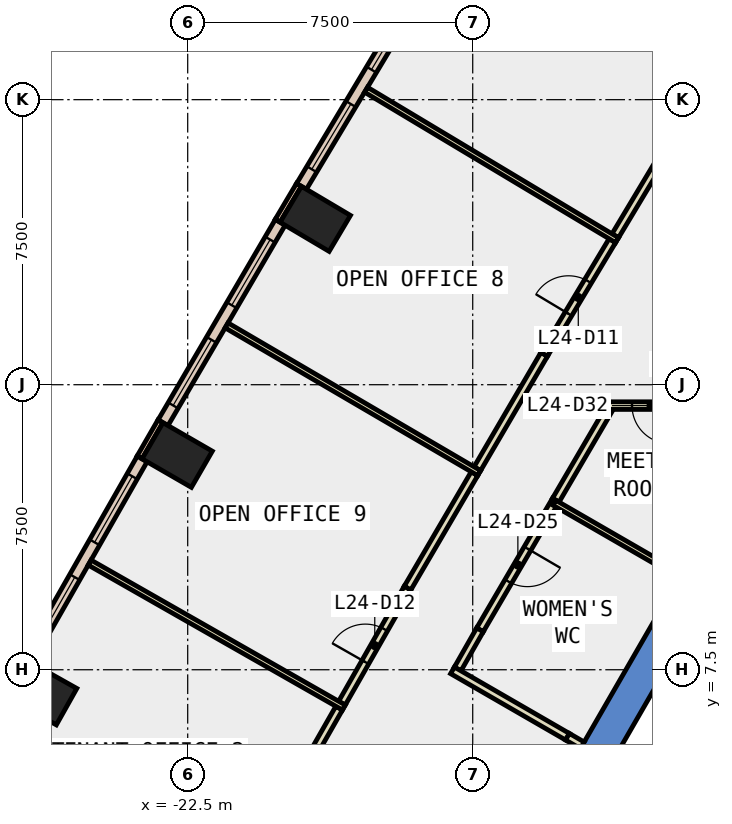
"""IFC4 building model, lengths in metres.
Left out: names, types, materials, properties, quantities, classifications, styles, units other than length and angle.
Written with IfcOpenShell. Run it as: python <this file> out.ifc"""

import sys

from ifc_helpers import new_model, si_unit, direction, frame, frame_2d, origin, origin_2d, place, context, subcontext, project, spatial, polyline, rectangle, outline, extrude, element, fill, save


model = new_model("IFC4")
c1 = context("Model", 3, precision=1e-05, world=origin(), true_north=direction((0.0, 1.0)))
c2 = subcontext(c1, "Body", "Model", "MODEL_VIEW")
j1 = project(units=[si_unit("LENGTHUNIT", "METRE"), si_unit("PLANEANGLEUNIT", "RADIAN")], contexts=[c1])
p1 = place(None, origin())
s1 = spatial("IfcSite", under=j1, at=p1, CompositionType="ELEMENT")
p2 = place(p1, origin())
s2 = spatial("IfcBuilding", under=s1, at=p2, CompositionType="ELEMENT")
p3 = place(p2, frame((0.0, 0.0, 111.8)))
s3 = spatial("IfcBuildingStorey", under=s2, at=p3, CompositionType="ELEMENT", Elevation=111.8)
for number, where, z_axis, x_axis in (
    (1, (-19.143, 19.364, -0.4), (0.0, 0.0, 1.0), (0.51, 0.86, 0.0)),
    (2, (-22.777, 13.15, -0.4), (0.0, 0.0, 1.0), (0.5, 0.866, 0.0)),
    (3, (-26.341, 6.896, -0.4), (0.0, 0.0, 1.0), (0.49, 0.872, 0.0)),
):
    element("IfcColumn", number, at=place(p3, frame(where, z_axis=z_axis, x_axis=x_axis)), inside=s3, PredefinedType="COLUMN", context=c2, shape_type="SweptSolid", body=[
        extrude(rectangle(XDim=1.1, YDim=1.5, at=origin_2d()), origin(), (0.0, 0.0, 1.0), 4.2),
    ])
p4 = place(p3, frame((0.0, 0.0, -0.4)))
e4 = element("IfcWall", 4, at=p4, inside=s3, PredefinedType="SHEAR", context=c2, shape_type="SweptSolid", body=[
    extrude(outline(polyline([(-12.267, 5.252), (-11.488, 4.802), (-6.409, 13.6), (-6.928, 14.5), (-12.267, 5.252)])), origin(), (0.0, 0.0, 1.0), 4.2),
])
p5 = place(p3, frame((-19.572, 20.258, 0.0), z_axis=(0.0, 0.0, 1.0), x_axis=(-0.510082245696, -0.860125631885, 0.0)))
e5 = element("IfcWall", 5, at=p5, inside=s3, PredefinedType="STANDARD", context=c2, shape_type="SweptSolid", body=[
    extrude(rectangle(XDim=1.1, YDim=0.15, at=frame_2d((0.55, 0.0))), origin(), (0.0, 0.0, 1.0), 3.8),
])
p6 = place(p3, frame((-23.216, 14.039, 0.0), z_axis=(0.0, 0.0, 1.0), x_axis=(-0.499837685251, -0.86611909597, 0.0)))
e6 = element("IfcWall", 6, at=p6, inside=s3, PredefinedType="STANDARD", context=c2, shape_type="SweptSolid", body=[
    extrude(rectangle(XDim=1.1, YDim=0.15, at=frame_2d((0.55, 0.0))), origin(), (0.0, 0.0, 1.0), 3.8),
])
p7 = place(p3, frame((-16.365, 25.458, 0.0), z_axis=(0.0, 0.0, 1.0), x_axis=(-0.514078503149, -0.857743139057, 0.0)))
e7 = element("IfcWall", 7, at=p7, inside=s3, PredefinedType="STANDARD", context=c2, shape_type="SweptSolid", body=[
    extrude(rectangle(XDim=6.11, YDim=0.3, at=frame_2d((3.055, 0.0))), origin(), (0.0, 0.0, 1.0), 3.8),
])
p8 = place(p7, frame((0.528, 0.0, 0.9)))
e8 = element("IfcOpeningElement", 8, at=p8, cuts=e7, PredefinedType="OPENING", context=c2, shape_type="SweptSolid", body=[
    extrude(rectangle(XDim=2.0, YDim=2.6, at=frame_2d((1.0, 1.3))), frame((0.0, 0.16, 0.0), z_axis=(0.0, -1.0, 0.0), x_axis=(1.0, 0.0, 0.0)), (0.0, 0.0, 1.0), 0.32),
])
p9 = place(p7, frame((3.583, 0.0, 0.9)))
e9 = element("IfcOpeningElement", 9, at=p9, cuts=e7, PredefinedType="OPENING", context=c2, shape_type="SweptSolid", body=[
    extrude(rectangle(XDim=2.0, YDim=2.6, at=frame_2d((1.0, 1.3))), frame((0.0, 0.16, 0.0), z_axis=(0.0, -1.0, 0.0), x_axis=(1.0, 0.0, 0.0)), (0.0, 0.0, 1.0), 0.32),
])
p10 = place(p3, frame((-20.065, 19.273, 0.0), z_axis=(0.0, 0.0, 1.0), x_axis=(-0.504790055126, -0.863242144619, 0.0)))
e10 = element("IfcWall", 10, at=p10, inside=s3, PredefinedType="STANDARD", context=c2, shape_type="SweptSolid", body=[
    extrude(rectangle(XDim=6.109, YDim=0.3, at=frame_2d((3.055, 0.0))), origin(), (0.0, 0.0, 1.0), 3.8),
])
p11 = place(p10, frame((0.527, 0.0, 0.9)))
e11 = element("IfcOpeningElement", 11, at=p11, cuts=e10, PredefinedType="OPENING", context=c2, shape_type="SweptSolid", body=[
    extrude(rectangle(XDim=2.0, YDim=2.6, at=frame_2d((1.0, 1.3))), frame((0.0, 0.16, 0.0), z_axis=(0.0, -1.0, 0.0), x_axis=(1.0, 0.0, 0.0)), (0.0, 0.0, 1.0), 0.32),
])
p12 = place(p10, frame((3.582, 0.0, 0.9)))
e12 = element("IfcOpeningElement", 12, at=p12, cuts=e10, PredefinedType="OPENING", context=c2, shape_type="SweptSolid", body=[
    extrude(rectangle(XDim=2.0, YDim=2.6, at=frame_2d((1.0, 1.3))), frame((0.0, 0.16, 0.0), z_axis=(0.0, -1.0, 0.0), x_axis=(1.0, 0.0, 0.0)), (0.0, 0.0, 1.0), 0.32),
])
p13 = place(p3, frame((-23.698, 13.048, 0.0), z_axis=(0.0, 0.0, 1.0), x_axis=(-0.495114366991, -0.868827810098, 0.0)))
e13 = element("IfcWall", 13, at=p13, inside=s3, PredefinedType="STANDARD", context=c2, shape_type="SweptSolid", body=[
    extrude(rectangle(XDim=6.11, YDim=0.3, at=frame_2d((3.055, 0.0))), origin(), (0.0, 0.0, 1.0), 3.8),
])
p14 = place(p13, frame((0.527, 0.0, 0.9)))
e14 = element("IfcOpeningElement", 14, at=p14, cuts=e13, PredefinedType="OPENING", context=c2, shape_type="SweptSolid", body=[
    extrude(rectangle(XDim=2.0, YDim=2.6, at=frame_2d((1.0, 1.3))), frame((0.0, 0.16, 0.0), z_axis=(0.0, -1.0, 0.0), x_axis=(1.0, 0.0, 0.0)), (0.0, 0.0, 1.0), 0.32),
])
p15 = place(p13, frame((3.582, 0.0, 0.9)))
e15 = element("IfcOpeningElement", 15, at=p15, cuts=e13, PredefinedType="OPENING", context=c2, shape_type="SweptSolid", body=[
    extrude(rectangle(XDim=2.0, YDim=2.6, at=frame_2d((1.0, 1.3))), frame((0.0, 0.16, 0.0), z_axis=(0.0, -1.0, 0.0), x_axis=(1.0, 0.0, 0.0)), (0.0, 0.0, 1.0), 0.32),
])
p16 = place(p3, frame((-11.409, 14.364, 0.0), z_axis=(0.0, 0.0, 1.0), x_axis=(-0.504846343003, -0.863209227219, 0.0)))
e16 = element("IfcWall", 16, at=p16, inside=s3, PredefinedType="PARTITIONING", context=c2, shape_type="SweptSolid", body=[
    extrude(rectangle(XDim=2.785, YDim=0.2, at=frame_2d((1.393, 0.0))), origin(), (0.0, 0.0, 1.0), 3.8),
])
p17 = place(p3, frame((-12.815, 11.96, 0.0), z_axis=(0.0, 0.0, 1.0), x_axis=(-0.5048198861, -0.863224699946, 0.0)))
e17 = element("IfcWall", 17, at=p17, inside=s3, PredefinedType="PARTITIONING", context=c2, shape_type="SweptSolid", body=[
    extrude(rectangle(XDim=3.95, YDim=0.2, at=frame_2d((1.975, 0.0))), origin(), (0.0, 0.0, 1.0), 3.8),
])
p18 = place(p17, frame((1.475, 0.0, 0.0)))
e18 = element("IfcOpeningElement", 18, at=p18, cuts=e17, PredefinedType="OPENING", context=c2, shape_type="SweptSolid", body=[
    extrude(rectangle(XDim=1.0, YDim=2.1, at=frame_2d((0.5, 1.05))), frame((0.0, 0.11, 0.0), z_axis=(0.0, -1.0, 0.0), x_axis=(1.0, 0.0, 0.0)), (0.0, 0.0, 1.0), 0.22),
])
p19 = place(p3, frame((-14.809, 8.55, 0.0), z_axis=(0.0, 0.0, 1.0), x_axis=(-0.495074026382, -0.868850797549, 0.0)))
e19 = element("IfcWall", 19, at=p19, inside=s3, PredefinedType="PARTITIONING", context=c2, shape_type="SweptSolid", body=[
    extrude(rectangle(XDim=1.186, YDim=0.2, at=frame_2d((0.593, 0.0))), origin(), (0.0, 0.0, 1.0), 3.8),
])
p20 = place(p3, frame((-15.532, 7.484, 0.0), z_axis=(0.0, 0.0, 1.0), x_axis=(0.866045954906, -0.499964402723, 0.0)))
e20 = element("IfcWall", 20, at=p20, inside=s3, PredefinedType="PARTITIONING", context=c2, shape_type="SweptSolid", body=[
    extrude(rectangle(XDim=3.494, YDim=0.2, at=frame_2d((1.747, 0.0))), origin(), (0.0, 0.0, 1.0), 3.8),
])
for number, where, z_axis, x_axis in (
    (21, (-11.249, 18.918, 0.0), (0.0, 0.0, 1.0), (0.514, 0.858, 0.0)),
    (22, (-14.879, 12.789, 0.0), (0.0, 0.0, 1.0), (0.505, 0.863, 0.0)),
):
    element("IfcWall", number, at=place(p3, frame(where, z_axis=z_axis, x_axis=x_axis)), inside=s3, PredefinedType="PARTITIONING", context=c2, shape_type="SweptSolid", body=[
        extrude(rectangle(XDim=3.487, YDim=0.2, at=frame_2d((1.743, 0.0))), origin(), (0.0, 0.0, 1.0), 3.8),
    ])
p21 = place(p3, frame((-13.119, 15.799, 0.0), z_axis=(0.0, 0.0, 1.0), x_axis=(0.514155958966, 0.857696712049, 0.0)))
e23 = element("IfcWall", 23, at=p21, inside=s3, PredefinedType="PARTITIONING", context=c2, shape_type="SweptSolid", body=[
    extrude(rectangle(XDim=3.487, YDim=0.2, at=frame_2d((1.744, 0.0))), origin(), (0.0, 0.0, 1.0), 3.8),
])
p22 = place(p21, frame((1.244, 0.0, 0.0)))
e24 = element("IfcOpeningElement", 24, at=p22, cuts=e23, PredefinedType="OPENING", context=c2, shape_type="SweptSolid", body=[
    extrude(rectangle(XDim=1.0, YDim=2.1, at=frame_2d((0.5, 1.05))), frame((0.0, 0.11, 0.0), z_axis=(0.0, -1.0, 0.0), x_axis=(1.0, 0.0, 0.0)), (0.0, 0.0, 1.0), 0.22),
])
p23 = place(p3, frame((-18.441, 6.621, 0.0), z_axis=(0.0, 0.0, 1.0), x_axis=(0.495286549488, 0.868729666753, 0.0)))
e25 = element("IfcWall", 25, at=p23, inside=s3, PredefinedType="PARTITIONING", context=c2, shape_type="SweptSolid", body=[
    extrude(rectangle(XDim=3.487, YDim=0.2, at=frame_2d((1.743, 0.0))), origin(), (0.0, 0.0, 1.0), 3.8),
])
p24 = place(p23, frame((1.243, 0.0, 0.0)))
e26 = element("IfcOpeningElement", 26, at=p24, cuts=e25, PredefinedType="OPENING", context=c2, shape_type="SweptSolid", body=[
    extrude(rectangle(XDim=1.0, YDim=2.1, at=frame_2d((0.5, 1.05))), frame((0.0, 0.11, 0.0), z_axis=(0.0, -1.0, 0.0), x_axis=(1.0, 0.0, 0.0)), (0.0, 0.0, 1.0), 0.22),
])
p25 = place(p3, frame((-16.714, 9.65, 0.0), z_axis=(0.0, 0.0, 1.0), x_axis=(0.504885284202, 0.863186451351, 0.0)))
e27 = element("IfcWall", 27, at=p25, inside=s3, PredefinedType="PARTITIONING", context=c2, shape_type="SweptSolid", body=[
    extrude(rectangle(XDim=3.486, YDim=0.2, at=frame_2d((1.743, 0.0))), origin(), (0.0, 0.0, 1.0), 3.8),
])
p26 = place(p3, frame((-20.242, 3.462, 0.0), z_axis=(0.0, 0.0, 1.0), x_axis=(0.495309264725, 0.868716715781, 0.0)))
e28 = element("IfcWall", 28, at=p26, inside=s3, PredefinedType="PARTITIONING", context=c2, shape_type="SweptSolid", body=[
    extrude(rectangle(XDim=3.487, YDim=0.2, at=frame_2d((1.743, 0.0))), origin(), (0.0, 0.0, 1.0), 3.8),
])
p27 = place(p3, frame((-9.537, 9.981, 0.0), z_axis=(0.0, 0.0, 1.0), x_axis=(-0.866068787954, 0.499924848885, 0.0)))
e29 = element("IfcWall", 29, at=p27, inside=s3, PredefinedType="PARTITIONING", context=c2, shape_type="SweptSolid", body=[
    extrude(rectangle(XDim=3.829, YDim=0.15, at=frame_2d((1.914, 0.0))), origin(), (0.0, 0.0, 1.0), 3.8),
])
p28 = place(p3, frame((-6.957, 14.45, 0.0), z_axis=(0.0, 0.0, 1.0), x_axis=(-1.0, 0.0, 0.0)))
e30 = element("IfcWall", 30, at=p28, inside=s3, PredefinedType="PARTITIONING", context=c2, shape_type="SweptSolid", body=[
    extrude(rectangle(XDim=4.502, YDim=0.2, at=frame_2d((2.251, 0.0))), origin(), (0.0, 0.0, 1.0), 3.8),
])
p29 = place(p28, frame((1.751, 0.0, 0.0)))
e31 = element("IfcOpeningElement", 31, at=p29, cuts=e30, PredefinedType="OPENING", context=c2, shape_type="SweptSolid", body=[
    extrude(rectangle(XDim=1.0, YDim=2.1, at=frame_2d((0.5, 1.05))), frame((0.0, 0.11, 0.0), z_axis=(0.0, -1.0, 0.0), x_axis=(1.0, 0.0, 0.0)), (0.0, 0.0, 1.0), 0.22),
])
p30 = place(p28, frame((2.851, 0.0, 0.0)))
e32 = element("IfcOpeningElement", 32, at=p30, cuts=e30, PredefinedType="OPENING", context=c2, shape_type="SweptSolid", body=[
    extrude(rectangle(XDim=1.0, YDim=2.1, at=frame_2d((0.5, 1.05))), frame((0.0, 0.11, 0.0), z_axis=(0.0, -1.0, 0.0), x_axis=(1.0, 0.0, 0.0)), (0.0, 0.0, 1.0), 0.22),
])
p31 = place(p3, frame((-11.202, 18.803, 0.0), z_axis=(0.0, 0.0, 1.0), x_axis=(-0.857778149162, 0.514020084062, 0.0)))
e33 = element("IfcWall", 33, at=p31, inside=s3, PredefinedType="PARTITIONING", context=c2, shape_type="SweptSolid", body=[
    extrude(rectangle(XDim=7.7, YDim=0.15, at=frame_2d((3.85, 0.0))), origin(), (0.0, 0.0, 1.0), 3.8),
])
p32 = place(p3, frame((-14.83, 12.674, 0.0), z_axis=(0.0, 0.0, 1.0), x_axis=(-0.863237916953, 0.504797284794, 0.0)))
e34 = element("IfcWall", 34, at=p32, inside=s3, PredefinedType="PARTITIONING", context=c2, shape_type="SweptSolid", body=[
    extrude(rectangle(XDim=7.7, YDim=0.15, at=frame_2d((3.85, 0.0))), origin(), (0.0, 0.0, 1.0), 3.8),
])
p33 = place(p3, frame((-18.391, 6.506, 0.0), z_axis=(0.0, 0.0, 1.0), x_axis=(-0.868738258528, 0.495271479261, 0.0)))
e35 = element("IfcWall", 35, at=p33, inside=s3, PredefinedType="PARTITIONING", context=c2, shape_type="SweptSolid", body=[
    extrude(rectangle(XDim=7.701, YDim=0.15, at=frame_2d((3.85, 0.0))), origin(), (0.0, 0.0, 1.0), 3.8),
])
p34 = place(p3, frame((-12.506, 5.737, 0.0), z_axis=(0.0, 0.0, 1.0), x_axis=(0.865624510465, -0.500693725627, 0.0)))
e36 = element("IfcWall", 36, at=p34, inside=s3, PredefinedType="PARTITIONING", context=c2, shape_type="SweptSolid", body=[
    extrude(rectangle(XDim=0.449, YDim=0.2, at=frame_2d((0.225, 0.0))), origin(), (0.0, 0.0, 1.0), 2.4),
])
p35 = place(p8, origin())
e37 = element("IfcWindow", 37, at=p35, inside=s3, PartitioningType="SINGLE_PANEL", PredefinedType="WINDOW", context=c2, shape_type="SweptSolid", body=[
    extrude(rectangle(XDim=2.0, YDim=2.6, at=frame_2d((1.0, 1.3))), frame((0.0, 0.03, 0.0), z_axis=(0.0, -1.0, 0.0), x_axis=(1.0, 0.0, 0.0)), (0.0, 0.0, 1.0), 0.06),
])
fill(e8, e37)
p36 = place(p9, origin())
e38 = element("IfcWindow", 38, at=p36, inside=s3, PartitioningType="SINGLE_PANEL", PredefinedType="WINDOW", context=c2, shape_type="SweptSolid", body=[
    extrude(rectangle(XDim=2.0, YDim=2.6, at=frame_2d((1.0, 1.3))), frame((0.0, 0.03, 0.0), z_axis=(0.0, -1.0, 0.0), x_axis=(1.0, 0.0, 0.0)), (0.0, 0.0, 1.0), 0.06),
])
fill(e9, e38)
p37 = place(p11, origin())
e39 = element("IfcWindow", 39, at=p37, inside=s3, PartitioningType="SINGLE_PANEL", PredefinedType="WINDOW", context=c2, shape_type="SweptSolid", body=[
    extrude(rectangle(XDim=2.0, YDim=2.6, at=frame_2d((1.0, 1.3))), frame((0.0, 0.03, 0.0), z_axis=(0.0, -1.0, 0.0), x_axis=(1.0, 0.0, 0.0)), (0.0, 0.0, 1.0), 0.06),
])
fill(e11, e39)
p38 = place(p12, origin())
e40 = element("IfcWindow", 40, at=p38, inside=s3, PartitioningType="SINGLE_PANEL", PredefinedType="WINDOW", context=c2, shape_type="SweptSolid", body=[
    extrude(rectangle(XDim=2.0, YDim=2.6, at=frame_2d((1.0, 1.3))), frame((0.0, 0.03, 0.0), z_axis=(0.0, -1.0, 0.0), x_axis=(1.0, 0.0, 0.0)), (0.0, 0.0, 1.0), 0.06),
])
fill(e12, e40)
p39 = place(p14, origin())
e41 = element("IfcWindow", 41, at=p39, inside=s3, PartitioningType="SINGLE_PANEL", PredefinedType="WINDOW", context=c2, shape_type="SweptSolid", body=[
    extrude(rectangle(XDim=2.0, YDim=2.6, at=frame_2d((1.0, 1.3))), frame((0.0, 0.03, 0.0), z_axis=(0.0, -1.0, 0.0), x_axis=(1.0, 0.0, 0.0)), (0.0, 0.0, 1.0), 0.06),
])
fill(e14, e41)
p40 = place(p15, origin())
e42 = element("IfcWindow", 42, at=p40, inside=s3, PartitioningType="SINGLE_PANEL", PredefinedType="WINDOW", context=c2, shape_type="SweptSolid", body=[
    extrude(rectangle(XDim=2.0, YDim=2.6, at=frame_2d((1.0, 1.3))), frame((0.0, 0.03, 0.0), z_axis=(0.0, -1.0, 0.0), x_axis=(1.0, 0.0, 0.0)), (0.0, 0.0, 1.0), 0.06),
])
fill(e15, e42)
p41 = place(p22, origin())
e43 = element("IfcDoor", 43, at=p41, inside=s3, OperationType="SINGLE_SWING_LEFT", PredefinedType="DOOR", context=c2, shape_type="SweptSolid", body=[
    extrude(rectangle(XDim=1.0, YDim=2.1, at=frame_2d((0.5, 1.05))), frame((0.0, 0.025, 0.0), z_axis=(0.0, -1.0, 0.0), x_axis=(1.0, 0.0, 0.0)), (0.0, 0.0, 1.0), 0.05),
])
fill(e24, e43)
p42 = place(p24, origin())
e44 = element("IfcDoor", 44, at=p42, inside=s3, OperationType="SINGLE_SWING_RIGHT", PredefinedType="DOOR", context=c2, shape_type="SweptSolid", body=[
    extrude(rectangle(XDim=1.0, YDim=2.1, at=frame_2d((0.5, 1.05))), frame((0.0, 0.025, 0.0), z_axis=(0.0, -1.0, 0.0), x_axis=(1.0, 0.0, 0.0)), (0.0, 0.0, 1.0), 0.05),
])
fill(e26, e44)
p43 = place(p18, origin())
e45 = element("IfcDoor", 45, at=p43, inside=s3, OperationType="SINGLE_SWING_RIGHT", PredefinedType="DOOR", context=c2, shape_type="SweptSolid", body=[
    extrude(rectangle(XDim=1.0, YDim=2.1, at=frame_2d((0.5, 1.05))), frame((0.0, 0.025, 0.0), z_axis=(0.0, -1.0, 0.0), x_axis=(1.0, 0.0, 0.0)), (0.0, 0.0, 1.0), 0.05),
])
fill(e18, e45)
p44 = place(p30, origin())
e46 = element("IfcDoor", 46, at=p44, inside=s3, OperationType="SINGLE_SWING_RIGHT", PredefinedType="DOOR", context=c2, shape_type="SweptSolid", body=[
    extrude(rectangle(XDim=1.0, YDim=2.1, at=frame_2d((0.5, 1.05))), frame((0.0, 0.025, 0.0), z_axis=(0.0, -1.0, 0.0), x_axis=(1.0, 0.0, 0.0)), (0.0, 0.0, 1.0), 0.05),
])
fill(e32, e46)
save(model, sys.argv[1])
